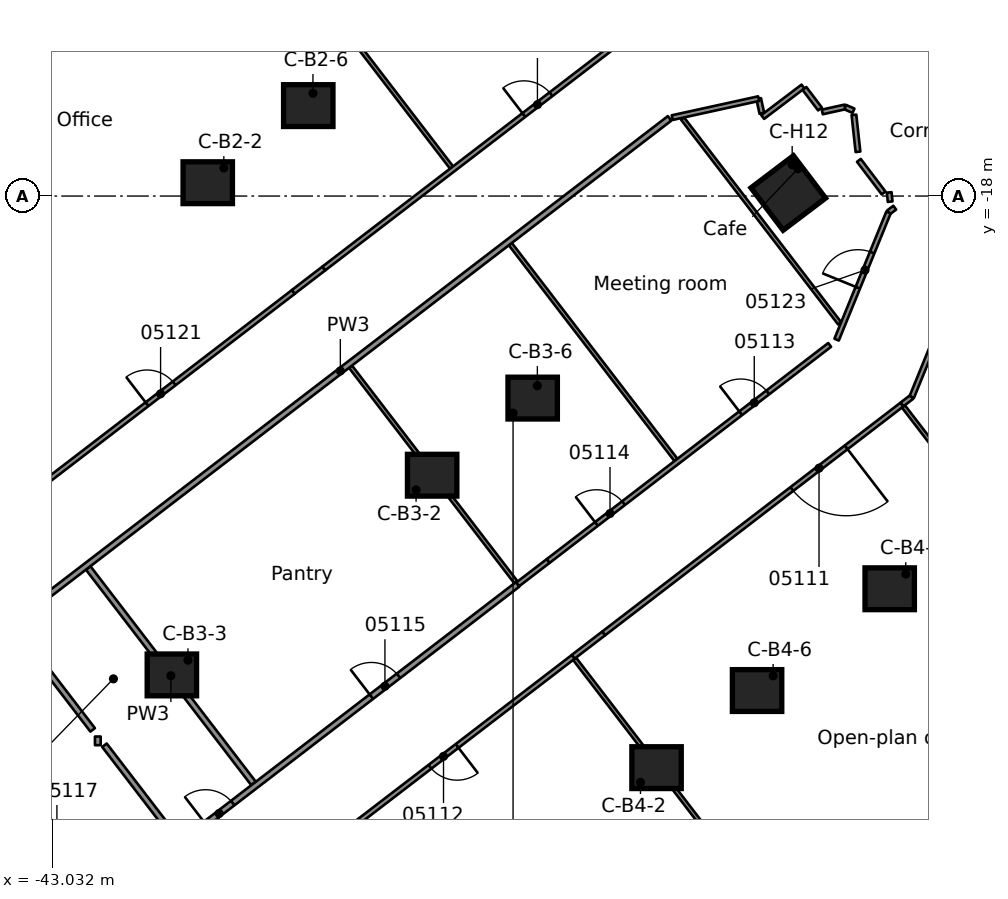
"""IFC4 building model, lengths in metres.
Left out: names, types, materials, properties, quantities, classifications, styles, units other than length and angle.
Written with IfcOpenShell. Run it as: python <this file> out.ifc"""

import sys

from ifc_helpers import new_model, si_unit, direction, frame, frame_2d, origin, origin_2d, place, context, subcontext, project, spatial, rectangle, extrude, element, fill, save


model = new_model("IFC4")
c1 = context("Model", 3, precision=1e-05, world=origin(), true_north=direction((0.0, 1.0)))
c2 = subcontext(c1, "Body", "Model", "MODEL_VIEW")
j1 = project(units=[si_unit("LENGTHUNIT", "METRE"), si_unit("PLANEANGLEUNIT", "RADIAN")], contexts=[c1])
p1 = place(None, origin())
s1 = spatial("IfcSite", under=j1, at=p1, CompositionType="ELEMENT")
p2 = place(p1, origin())
s2 = spatial("IfcBuilding", under=s1, at=p2, CompositionType="ELEMENT")
p3 = place(p2, frame((0.0, 0.0, 25.1)))
s3 = spatial("IfcBuildingStorey", under=s2, at=p3, CompositionType="ELEMENT", Elevation=25.1)
for number, where, z_axis, x_axis in (
    (1, (-38.935, -17.649, 0.0), (0.0, 0.0, 1.0), (1.0, 0.0, 0.0)),
    (2, (-36.29, -15.62, 0.0), (0.0, 0.0, 1.0), (1.0, 0.0, 0.0)),
    (3, (-33.03, -25.345, 0.0), (0.0, 0.0, 1.0), (1.0, 0.0, 0.0)),
    (4, (-39.879, -30.6, 0.0), (0.0, 0.0, 1.0), (1.0, 0.0, 0.0)),
    (5, (-30.385, -23.316, 0.0), (0.0, 0.0, 1.0), (1.0, 0.0, 0.0)),
    (6, (-27.125, -33.04, 0.0), (0.0, 0.0, 1.0), (1.0, 0.0, 0.0)),
    (7, (-24.48, -31.011, 0.0), (0.0, 0.0, 1.0), (1.0, 0.0, 0.0)),
    (8, (-20.99, -28.333, 0.0), (0.0, 0.0, 1.0), (1.0, 0.0, 0.0)),
):
    element("IfcColumn", number, at=place(p3, frame(where, z_axis=z_axis, x_axis=x_axis)), inside=s3, PredefinedType="COLUMN", context=c2, shape_type="SweptSolid", body=[
        extrude(rectangle(XDim=1.3, YDim=1.1, at=origin_2d()), origin(), (0.0, 0.0, 1.0), 4.1),
    ])
p4 = place(p3, frame((-23.659, -17.919, 0.0), z_axis=(0.0, 0.0, 1.0), x_axis=(-0.797162615875, -0.603764659327, 0.0)))
e9 = element("IfcColumn", 9, at=p4, inside=s3, PredefinedType="COLUMN", context=c2, shape_type="SweptSolid", body=[
    extrude(rectangle(XDim=1.4, YDim=1.4, at=origin_2d()), origin(), (0.0, 0.0, 1.0), 4.1),
])
p5 = place(p3, frame((-21.004, -17.904, 0.0), z_axis=(0.0, 0.0, 1.0), x_axis=(0.105933230141, -0.994373245191, 0.0)))
e10 = element("IfcWall", 10, at=p5, inside=s3, PredefinedType="PARTITIONING", context=c2, shape_type="SweptSolid", body=[
    extrude(rectangle(XDim=0.244, YDim=0.125, at=frame_2d((0.122, 0.0))), origin(), (0.0, 0.0, 1.0), 3.68),
])
p6 = place(p3, frame((-21.931, -15.864, 0.0), z_axis=(0.0, 0.0, 1.0), x_axis=(0.10837572028, -0.99411000561, 0.0)))
e11 = element("IfcWall", 11, at=p6, inside=s3, PredefinedType="PARTITIONING", context=c2, shape_type="SweptSolid", body=[
    extrude(rectangle(XDim=0.978, YDim=0.125, at=frame_2d((0.489, 0.0))), origin(), (0.0, 0.0, 1.0), 3.68),
])
p7 = place(p3, frame((-24.438, -15.437, 0.0), z_axis=(0.0, 0.0, 1.0), x_axis=(0.212096867325, -0.977248647413, 0.0)))
e12 = element("IfcWall", 12, at=p7, inside=s3, PredefinedType="PARTITIONING", context=c2, shape_type="SweptSolid", body=[
    extrude(rectangle(XDim=0.396, YDim=0.125, at=frame_2d((0.198, 0.0))), origin(), (0.0, 0.0, 1.0), 3.68),
])
p8 = place(p3, frame((-23.234, -15.168, 0.0), z_axis=(0.0, 0.0, 1.0), x_axis=(0.602990949897, -0.797748026849, 0.0)))
e13 = element("IfcWall", 13, at=p8, inside=s3, PredefinedType="PARTITIONING", context=c2, shape_type="SweptSolid", body=[
    extrude(rectangle(XDim=0.678, YDim=0.125, at=frame_2d((0.339, 0.0))), origin(), (0.0, 0.0, 1.0), 3.68),
])
p9 = place(p3, frame((-21.801, -17.061, 0.0), z_axis=(0.0, 0.0, 1.0), x_axis=(0.604123687543, -0.796890563471, 0.0)))
e14 = element("IfcWall", 14, at=p9, inside=s3, PredefinedType="PARTITIONING", context=c2, shape_type="SweptSolid", body=[
    extrude(rectangle(XDim=1.078, YDim=0.125, at=frame_2d((0.539, 0.0))), origin(), (0.0, 0.0, 1.0), 3.68),
])
p10 = place(p3, frame((-40.384, -38.535, 0.0), z_axis=(0.0, 0.0, 1.0), x_axis=(-0.609026744184, 0.793149686294, 0.0)))
e15 = element("IfcWall", 15, at=p10, inside=s3, PredefinedType="PARTITIONING", context=c2, shape_type="SweptSolid", body=[
    extrude(rectangle(XDim=11.975, YDim=0.125, at=frame_2d((5.987, 0.0))), origin(), (0.0, 0.0, 1.0), 3.68),
])
p11 = place(p10, frame((3.688, 0.0, 0.0)))
e16 = element("IfcOpeningElement", 16, at=p11, cuts=e15, PredefinedType="OPENING", context=c2, shape_type="SweptSolid", body=[
    extrude(rectangle(XDim=0.9, YDim=2.1, at=frame_2d((0.45, 1.05))), frame((0.0, 0.073, 0.0), z_axis=(0.0, -1.0, 0.0), x_axis=(1.0, 0.0, 0.0)), (0.0, 0.0, 1.0), 0.145),
])
p12 = place(p10, frame((7.338, 0.0, 0.0)))
e17 = element("IfcOpeningElement", 17, at=p12, cuts=e15, PredefinedType="OPENING", context=c2, shape_type="SweptSolid", body=[
    extrude(rectangle(XDim=0.9, YDim=2.1, at=frame_2d((0.45, 1.05))), frame((0.0, 0.073, 0.0), z_axis=(0.0, -1.0, 0.0), x_axis=(1.0, 0.0, 0.0)), (0.0, 0.0, 1.0), 0.145),
])
p13 = place(p3, frame((-44.064, -29.307, 0.0), z_axis=(0.0, 0.0, 1.0), x_axis=(0.608421148176, -0.793614331053, 0.0)))
e18 = element("IfcWall", 18, at=p13, inside=s3, PredefinedType="PARTITIONING", context=c2, shape_type="SweptSolid", body=[
    extrude(rectangle(XDim=3.451, YDim=0.15, at=frame_2d((1.726, 0.0))), origin(), (0.0, 0.0, 1.0), 3.68),
])
p14 = place(p3, frame((-41.653, -32.45, 0.0), z_axis=(0.0, 0.0, 1.0), x_axis=(0.60867753108, -0.793417710389, 0.0)))
e19 = element("IfcWall", 19, at=p14, inside=s3, PredefinedType="PARTITIONING", context=c2, shape_type="SweptSolid", body=[
    extrude(rectangle(XDim=3.188, YDim=0.15, at=frame_2d((1.594, 0.0))), origin(), (0.0, 0.0, 1.0), 3.68),
])
p15 = place(p3, frame((-42.081, -27.786, 0.0), z_axis=(0.0, 0.0, 1.0), x_axis=(0.608779288924, -0.793339635577, 0.0)))
e20 = element("IfcWall", 20, at=p15, inside=s3, PredefinedType="PARTITIONING", context=c2, shape_type="SweptSolid", body=[
    extrude(rectangle(XDim=7.147, YDim=0.15, at=frame_2d((3.574, 0.0))), origin(), (0.0, 0.0, 1.0), 3.68),
])
p16 = place(p3, frame((-35.179, -22.489, 0.0), z_axis=(0.0, 0.0, 1.0), x_axis=(0.608729798771, -0.793377610024, 0.0)))
e21 = element("IfcWall", 21, at=p16, inside=s3, PredefinedType="PARTITIONING", context=c2, shape_type="SweptSolid", body=[
    extrude(rectangle(XDim=7.148, YDim=0.1, at=frame_2d((3.574, 0.0))), origin(), (0.0, 0.0, 1.0), 3.68),
])
p17 = place(p3, frame((-29.282, -30.176, 0.0), z_axis=(0.0, 0.0, 1.0), x_axis=(0.608773787241, -0.793343857333, 0.0)))
e22 = element("IfcWall", 22, at=p17, inside=s3, PredefinedType="PARTITIONING", context=c2, shape_type="SweptSolid", body=[
    extrude(rectangle(XDim=14.135, YDim=0.1, at=frame_2d((7.067, 0.0))), origin(), (0.0, 0.0, 1.0), 3.68),
])
p18 = place(p3, frame((-41.126, -6.033, 0.0), z_axis=(0.0, 0.0, 1.0), x_axis=(0.608775561638, -0.793342495743, 0.0)))
e23 = element("IfcWall", 23, at=p18, inside=s3, PredefinedType="PARTITIONING", context=c2, shape_type="SweptSolid", body=[
    extrude(rectangle(XDim=14.136, YDim=0.1, at=frame_2d((7.068, 0.0))), origin(), (0.0, 0.0, 1.0), 3.68),
])
p19 = place(p3, frame((-30.975, -19.261, 0.0), z_axis=(0.0, 0.0, 1.0), x_axis=(0.60876639971, -0.793349526113, 0.0)))
e24 = element("IfcWall", 24, at=p19, inside=s3, PredefinedType="PARTITIONING", context=c2, shape_type="SweptSolid", body=[
    extrude(rectangle(XDim=7.162, YDim=0.1, at=frame_2d((3.581, 0.0))), origin(), (0.0, 0.0, 1.0), 3.68),
])
p20 = place(p3, frame((-26.44, -15.962, 0.0), z_axis=(0.0, 0.0, 1.0), x_axis=(0.608697215762, -0.79340260872, 0.0)))
e25 = element("IfcWall", 25, at=p20, inside=s3, PredefinedType="PARTITIONING", context=c2, shape_type="SweptSolid", body=[
    extrude(rectangle(XDim=6.79, YDim=0.1, at=frame_2d((3.395, 0.0))), origin(), (0.0, 0.0, 1.0), 3.68),
])
p21 = place(p3, frame((-20.629, -23.535, 0.0), z_axis=(0.0, 0.0, 1.0), x_axis=(0.608775561638, -0.793342495743, 0.0)))
e26 = element("IfcWall", 26, at=p21, inside=s3, PredefinedType="PARTITIONING", context=c2, shape_type="SweptSolid", body=[
    extrude(rectangle(XDim=14.136, YDim=0.1, at=frame_2d((7.068, 0.0))), origin(), (0.0, 0.0, 1.0), 3.68),
])
p22 = place(p3, frame((-22.17, -15.656, 0.0), z_axis=(0.0, 0.0, 1.0), x_axis=(0.914864311429, -0.403761429156, 0.0)))
e27 = element("IfcWall", 27, at=p22, inside=s3, PredefinedType="PARTITIONING", context=c2, shape_type="SweptSolid", body=[
    extrude(rectangle(XDim=0.248, YDim=0.125, at=frame_2d((0.124, 0.0))), origin(), (0.0, 0.0, 1.0), 3.68),
])
p23 = place(p3, frame((-26.712, -15.936, 0.0), z_axis=(0.0, 0.0, 1.0), x_axis=(0.976756126143, 0.214353609817, 0.0)))
e28 = element("IfcWall", 28, at=p23, inside=s3, PredefinedType="PARTITIONING", context=c2, shape_type="SweptSolid", body=[
    extrude(rectangle(XDim=2.328, YDim=0.125, at=frame_2d((1.164, 0.0))), origin(), (0.0, 0.0, 1.0), 3.68),
])
p24 = place(p3, frame((-22.765, -15.787, 0.0), z_axis=(0.0, 0.0, 1.0), x_axis=(0.97657209397, 0.215190486033, 0.0)))
e29 = element("IfcWall", 29, at=p24, inside=s3, PredefinedType="PARTITIONING", context=c2, shape_type="SweptSolid", body=[
    extrude(rectangle(XDim=0.609, YDim=0.125, at=frame_2d((0.305, 0.0))), origin(), (0.0, 0.0, 1.0), 3.68),
])
p25 = place(p3, frame((-24.332, -15.92, 0.0), z_axis=(0.0, 0.0, 1.0), x_axis=(0.797480426333, 0.603344818172, 0.0)))
e30 = element("IfcWall", 30, at=p25, inside=s3, PredefinedType="PARTITIONING", context=c2, shape_type="SweptSolid", body=[
    extrude(rectangle(XDim=1.329, YDim=0.125, at=frame_2d((0.665, 0.0))), origin(), (0.0, 0.0, 1.0), 3.68),
])
p26 = place(p3, frame((-21.019, -18.428, 0.0), z_axis=(0.0, 0.0, 1.0), x_axis=(0.797092148154, 0.603857687995, 0.0)))
e31 = element("IfcWall", 31, at=p26, inside=s3, PredefinedType="PARTITIONING", context=c2, shape_type="SweptSolid", body=[
    extrude(rectangle(XDim=0.202, YDim=0.125, at=frame_2d((0.101, 0.0))), origin(), (0.0, 0.0, 1.0), 3.68),
])
p27 = place(p3, frame((-29.32, -30.124, 0.0), z_axis=(0.0, 0.0, 1.0), x_axis=(0.793776779764, 0.608209194198, 0.0)))
e32 = element("IfcWall", 32, at=p27, inside=s3, PredefinedType="PARTITIONING", context=c2, shape_type="SweptSolid", body=[
    extrude(rectangle(XDim=1.014, YDim=0.125, at=frame_2d((0.507, 0.0))), origin(), (0.0, 0.0, 1.0), 3.68),
])
p28 = place(p3, frame((-20.668, -23.484, 0.0), z_axis=(0.0, 0.0, 1.0), x_axis=(0.794079485755, 0.607813927368, 0.0)))
e33 = element("IfcWall", 33, at=p28, inside=s3, PredefinedType="PARTITIONING", context=c2, shape_type="SweptSolid", body=[
    extrude(rectangle(XDim=0.324, YDim=0.125, at=frame_2d((0.162, 0.0))), origin(), (0.0, 0.0, 1.0), 3.68),
])
p29 = place(p3, frame((-29.32, -30.127, 0.0), z_axis=(0.0, 0.0, 1.0), x_axis=(-0.793456491448, -0.608626976217, 0.0)))
e34 = element("IfcWall", 34, at=p29, inside=s3, PredefinedType="PARTITIONING", context=c2, shape_type="SweptSolid", body=[
    extrude(rectangle(XDim=13.898, YDim=0.125, at=frame_2d((6.949, 0.0))), origin(), (0.0, 0.0, 1.0), 3.68),
])
p30 = place(p29, frame((3.849, 0.0, 0.0)))
e35 = element("IfcOpeningElement", 35, at=p30, cuts=e34, PredefinedType="OPENING", context=c2, shape_type="SweptSolid", body=[
    extrude(rectangle(XDim=0.9, YDim=2.1, at=frame_2d((0.45, 1.05))), frame((0.0, 0.073, 0.0), z_axis=(0.0, -1.0, 0.0), x_axis=(1.0, 0.0, 0.0)), (0.0, 0.0, 1.0), 0.145),
])
p31 = place(p3, frame((-20.669, -23.487, 0.0), z_axis=(0.0, 0.0, 1.0), x_axis=(-0.793372266626, -0.608736762935, 0.0)))
e36 = element("IfcWall", 36, at=p31, inside=s3, PredefinedType="PARTITIONING", context=c2, shape_type="SweptSolid", body=[
    extrude(rectangle(XDim=9.889, YDim=0.125, at=frame_2d((4.945, 0.0))), origin(), (0.0, 0.0, 1.0), 3.68),
])
p32 = place(p31, frame((1.849, 0.0, 0.0)))
e37 = element("IfcOpeningElement", 37, at=p32, cuts=e36, PredefinedType="OPENING", context=c2, shape_type="SweptSolid", body=[
    extrude(rectangle(XDim=1.8, YDim=2.1, at=frame_2d((0.9, 1.05))), frame((0.0, 0.073, 0.0), z_axis=(0.0, -1.0, 0.0), x_axis=(1.0, 0.0, 0.0)), (0.0, 0.0, 1.0), 0.145),
])
p33 = place(p3, frame((-30.782, -28.22, 0.0), z_axis=(0.0, 0.0, 1.0), x_axis=(0.793579274907, 0.608466872096, 0.0)))
e38 = element("IfcWall", 38, at=p33, inside=s3, PredefinedType="PARTITIONING", context=c2, shape_type="SweptSolid", body=[
    extrude(rectangle(XDim=1.016, YDim=0.125, at=frame_2d((0.508, 0.0))), origin(), (0.0, 0.0, 1.0), 3.68),
])
p34 = place(p3, frame((-39.667, -35.038, 0.0), z_axis=(0.0, 0.0, 1.0), x_axis=(0.793293656215, 0.608839202917, 0.0)))
e39 = element("IfcWall", 39, at=p34, inside=s3, PredefinedType="PARTITIONING", context=c2, shape_type="SweptSolid", body=[
    extrude(rectangle(XDim=11.2, YDim=0.15, at=frame_2d((5.6, 0.0))), origin(), (0.0, 0.0, 1.0), 3.68),
])
p35 = place(p34, frame((6.35, 0.0, 0.0)))
e40 = element("IfcOpeningElement", 40, at=p35, cuts=e39, PredefinedType="OPENING", context=c2, shape_type="SweptSolid", body=[
    extrude(rectangle(XDim=0.9, YDim=2.1, at=frame_2d((0.45, 1.05))), frame((0.0, 0.085, 0.0), z_axis=(0.0, -1.0, 0.0), x_axis=(1.0, 0.0, 0.0)), (0.0, 0.0, 1.0), 0.17),
])
p36 = place(p34, frame((0.85, 0.0, 0.0)))
e41 = element("IfcOpeningElement", 41, at=p36, cuts=e39, PredefinedType="OPENING", context=c2, shape_type="SweptSolid", body=[
    extrude(rectangle(XDim=0.9, YDim=2.1, at=frame_2d((0.45, 1.05))), frame((0.0, 0.085, 0.0), z_axis=(0.0, -1.0, 0.0), x_axis=(1.0, 0.0, 0.0)), (0.0, 0.0, 1.0), 0.17),
])
p37 = place(p3, frame((-29.976, -27.602, 0.0), z_axis=(0.0, 0.0, 1.0), x_axis=(0.793237948633, 0.608911780843, 0.0)))
e42 = element("IfcWall", 42, at=p37, inside=s3, PredefinedType="PARTITIONING", context=c2, shape_type="SweptSolid", body=[
    extrude(rectangle(XDim=9.336, YDim=0.125, at=frame_2d((4.668, 0.0))), origin(), (0.0, 0.0, 1.0), 3.68),
])
p38 = place(p37, frame((6.385, 0.0, 0.0)))
e43 = element("IfcOpeningElement", 43, at=p38, cuts=e42, PredefinedType="OPENING", context=c2, shape_type="SweptSolid", body=[
    extrude(rectangle(XDim=0.9, YDim=2.1, at=frame_2d((0.45, 1.05))), frame((0.0, 0.073, 0.0), z_axis=(0.0, -1.0, 0.0), x_axis=(1.0, 0.0, 0.0)), (0.0, 0.0, 1.0), 0.145),
])
p39 = place(p37, frame((1.6, 0.0, 0.0)))
e44 = element("IfcOpeningElement", 44, at=p39, cuts=e42, PredefinedType="OPENING", context=c2, shape_type="SweptSolid", body=[
    extrude(rectangle(XDim=0.9, YDim=2.1, at=frame_2d((0.45, 1.05))), frame((0.0, 0.073, 0.0), z_axis=(0.0, -1.0, 0.0), x_axis=(1.0, 0.0, 0.0)), (0.0, 0.0, 1.0), 0.145),
])
p40 = place(p3, frame((-44.11, -29.247, 0.0), z_axis=(0.0, 0.0, 1.0), x_axis=(0.793471030698, 0.608608021179, 0.0)))
e45 = element("IfcWall", 45, at=p40, inside=s3, PredefinedType="PARTITIONING", context=c2, shape_type="SweptSolid", body=[
    extrude(rectangle(XDim=21.838, YDim=0.15, at=frame_2d((10.919, 0.0))), origin(), (0.0, 0.0, 1.0), 3.68),
])
p41 = place(p3, frame((-36.687, -20.524, 0.0), z_axis=(0.0, 0.0, 1.0), x_axis=(0.793579274907, 0.608466872096, 0.0)))
e46 = element("IfcWall", 46, at=p41, inside=s3, PredefinedType="PARTITIONING", context=c2, shape_type="SweptSolid", body=[
    extrude(rectangle(XDim=1.016, YDim=0.125, at=frame_2d((0.508, 0.0))), origin(), (0.0, 0.0, 1.0), 3.68),
])
p42 = place(p3, frame((-47.476, -28.803, 0.0), z_axis=(0.0, 0.0, 1.0), x_axis=(0.793430085013, 0.608661400284, 0.0)))
e47 = element("IfcWall", 47, at=p42, inside=s3, PredefinedType="PARTITIONING", context=c2, shape_type="SweptSolid", body=[
    extrude(rectangle(XDim=13.6, YDim=0.125, at=frame_2d((6.8, 0.0))), origin(), (0.0, 0.0, 1.0), 3.68),
])
p43 = place(p42, frame((2.326, 0.0, 0.0)))
e48 = element("IfcOpeningElement", 48, at=p43, cuts=e47, PredefinedType="OPENING", context=c2, shape_type="SweptSolid", body=[
    extrude(rectangle(XDim=0.9, YDim=2.1, at=frame_2d((0.45, 1.05))), frame((0.0, 0.073, 0.0), z_axis=(0.0, -1.0, 0.0), x_axis=(1.0, 0.0, 0.0)), (0.0, 0.0, 1.0), 0.145),
])
p44 = place(p42, frame((8.75, 0.0, 0.0)))
e49 = element("IfcOpeningElement", 49, at=p44, cuts=e47, PredefinedType="OPENING", context=c2, shape_type="SweptSolid", body=[
    extrude(rectangle(XDim=0.9, YDim=2.1, at=frame_2d((0.45, 1.05))), frame((0.0, 0.073, 0.0), z_axis=(0.0, -1.0, 0.0), x_axis=(1.0, 0.0, 0.0)), (0.0, 0.0, 1.0), 0.145),
])
p45 = place(p3, frame((-35.881, -19.906, 0.0), z_axis=(0.0, 0.0, 1.0), x_axis=(0.793491146474, 0.608581794394, 0.0)))
e50 = element("IfcWall", 50, at=p45, inside=s3, PredefinedType="PARTITIONING", context=c2, shape_type="SweptSolid", body=[
    extrude(rectangle(XDim=9.892, YDim=0.125, at=frame_2d((4.946, 0.0))), origin(), (0.0, 0.0, 1.0), 3.68),
])
p46 = place(p45, frame((6.634, 0.0, 0.0)))
e51 = element("IfcOpeningElement", 51, at=p46, cuts=e50, PredefinedType="OPENING", context=c2, shape_type="SweptSolid", body=[
    extrude(rectangle(XDim=0.9, YDim=2.1, at=frame_2d((0.45, 1.05))), frame((0.0, 0.073, 0.0), z_axis=(0.0, -1.0, 0.0), x_axis=(1.0, 0.0, 0.0)), (0.0, 0.0, 1.0), 0.145),
])
p47 = place(p3, frame((-18.51, -18.634, 0.0), z_axis=(0.0, 0.0, 1.0), x_axis=(-0.377932698015, -0.925833071224, 0.0)))
e52 = element("IfcWall", 52, at=p47, inside=s3, PredefinedType="PARTITIONING", context=c2, shape_type="SweptSolid", body=[
    extrude(rectangle(XDim=5.024, YDim=0.125, at=frame_2d((2.512, 0.0))), origin(), (0.0, 0.0, 1.0), 3.68),
])
p48 = place(p47, frame((1.6, 0.0, 0.0)))
e53 = element("IfcOpeningElement", 53, at=p48, cuts=e52, PredefinedType="OPENING", context=c2, shape_type="SweptSolid", body=[
    extrude(rectangle(XDim=1.8, YDim=2.1, at=frame_2d((0.9, 1.05))), frame((0.0, 0.073, 0.0), z_axis=(0.0, -1.0, 0.0), x_axis=(1.0, 0.0, 0.0)), (0.0, 0.0, 1.0), 0.145),
])
p49 = place(p3, frame((-22.387, -21.778, 0.0), z_axis=(0.0, 0.0, 1.0), x_axis=(0.377843834017, 0.925869341265, 0.0)))
e54 = element("IfcWall", 54, at=p49, inside=s3, PredefinedType="PARTITIONING", context=c2, shape_type="SweptSolid", body=[
    extrude(rectangle(XDim=3.615, YDim=0.125, at=frame_2d((1.808, 0.0))), origin(), (0.0, 0.0, 1.0), 3.68),
])
p50 = place(p49, frame((1.476, 0.0, 0.0)))
e55 = element("IfcOpeningElement", 55, at=p50, cuts=e54, PredefinedType="OPENING", context=c2, shape_type="SweptSolid", body=[
    extrude(rectangle(XDim=1.0, YDim=2.1, at=frame_2d((0.5, 1.05))), frame((0.0, 0.073, 0.0), z_axis=(0.0, -1.0, 0.0), x_axis=(1.0, 0.0, 0.0)), (0.0, 0.0, 1.0), 0.145),
])
p51 = place(p3, frame((-41.828, -32.449, 0.0), z_axis=(0.0, 0.0, 1.0), x_axis=(0.0, 1.0, 0.0)))
e56 = element("IfcWall", 56, at=p51, inside=s3, PredefinedType="PARTITIONING", context=c2, shape_type="SweptSolid", body=[
    extrude(rectangle(XDim=0.228, YDim=0.15, at=frame_2d((0.114, 0.0))), origin(), (0.0, 0.0, 1.0), 3.68),
])
p52 = place(p32, origin())
e57 = element("IfcDoor", 57, at=p52, inside=s3, OperationType="DOUBLE_DOOR_SINGLE_SWING", PredefinedType="DOOR", context=c2, shape_type="SweptSolid", body=[
    extrude(rectangle(XDim=1.8, YDim=2.1, at=frame_2d((0.9, 1.05))), frame((0.0, 0.025, 0.0), z_axis=(0.0, -1.0, 0.0), x_axis=(1.0, 0.0, 0.0)), (0.0, 0.0, 1.0), 0.05),
])
fill(e37, e57)
p53 = place(p30, origin())
e58 = element("IfcDoor", 58, at=p53, inside=s3, OperationType="SINGLE_SWING_LEFT", PredefinedType="DOOR", context=c2, shape_type="SweptSolid", body=[
    extrude(rectangle(XDim=0.9, YDim=2.1, at=frame_2d((0.45, 1.05))), frame((0.0, 0.025, 0.0), z_axis=(0.0, -1.0, 0.0), x_axis=(1.0, 0.0, 0.0)), (0.0, 0.0, 1.0), 0.05),
])
fill(e35, e58)
p54 = place(p38, origin())
e59 = element("IfcDoor", 59, at=p54, inside=s3, OperationType="SINGLE_SWING_RIGHT", PredefinedType="DOOR", context=c2, shape_type="SweptSolid", body=[
    extrude(rectangle(XDim=0.9, YDim=2.1, at=frame_2d((0.45, 1.05))), frame((0.0, 0.025, 0.0), z_axis=(0.0, -1.0, 0.0), x_axis=(1.0, 0.0, 0.0)), (0.0, 0.0, 1.0), 0.05),
])
fill(e43, e59)
p55 = place(p39, origin())
e60 = element("IfcDoor", 60, at=p55, inside=s3, OperationType="SINGLE_SWING_LEFT", PredefinedType="DOOR", context=c2, shape_type="SweptSolid", body=[
    extrude(rectangle(XDim=0.9, YDim=2.1, at=frame_2d((0.45, 1.05))), frame((0.0, 0.025, 0.0), z_axis=(0.0, -1.0, 0.0), x_axis=(1.0, 0.0, 0.0)), (0.0, 0.0, 1.0), 0.05),
])
fill(e44, e60)
p56 = place(p35, origin())
e61 = element("IfcDoor", 61, at=p56, inside=s3, OperationType="SINGLE_SWING_RIGHT", PredefinedType="DOOR", context=c2, shape_type="SweptSolid", body=[
    extrude(rectangle(XDim=0.9, YDim=2.1, at=frame_2d((0.45, 1.05))), frame((0.0, 0.025, 0.0), z_axis=(0.0, -1.0, 0.0), x_axis=(1.0, 0.0, 0.0)), (0.0, 0.0, 1.0), 0.05),
])
fill(e40, e61)
p57 = place(p36, origin())
e62 = element("IfcDoor", 62, at=p57, inside=s3, OperationType="SINGLE_SWING_LEFT", PredefinedType="DOOR", context=c2, shape_type="SweptSolid", body=[
    extrude(rectangle(XDim=0.9, YDim=2.1, at=frame_2d((0.45, 1.05))), frame((0.0, 0.025, 0.0), z_axis=(0.0, -1.0, 0.0), x_axis=(1.0, 0.0, 0.0)), (0.0, 0.0, 1.0), 0.05),
])
fill(e41, e62)
p58 = place(p46, origin())
e63 = element("IfcDoor", 63, at=p58, inside=s3, OperationType="SINGLE_SWING_RIGHT", PredefinedType="DOOR", context=c2, shape_type="SweptSolid", body=[
    extrude(rectangle(XDim=0.9, YDim=2.1, at=frame_2d((0.45, 1.05))), frame((0.0, 0.025, 0.0), z_axis=(0.0, -1.0, 0.0), x_axis=(1.0, 0.0, 0.0)), (0.0, 0.0, 1.0), 0.05),
])
fill(e51, e63)
p59 = place(p44, origin())
e64 = element("IfcDoor", 64, at=p59, inside=s3, OperationType="SINGLE_SWING_RIGHT", PredefinedType="DOOR", context=c2, shape_type="SweptSolid", body=[
    extrude(rectangle(XDim=0.9, YDim=2.1, at=frame_2d((0.45, 1.05))), frame((0.0, 0.025, 0.0), z_axis=(0.0, -1.0, 0.0), x_axis=(1.0, 0.0, 0.0)), (0.0, 0.0, 1.0), 0.05),
])
fill(e49, e64)
p60 = place(p50, origin())
e65 = element("IfcDoor", 65, at=p60, inside=s3, OperationType="SINGLE_SWING_RIGHT", PredefinedType="DOOR", context=c2, shape_type="SweptSolid", body=[
    extrude(rectangle(XDim=1.0, YDim=2.1, at=frame_2d((0.5, 1.05))), frame((0.0, 0.025, 0.0), z_axis=(0.0, -1.0, 0.0), x_axis=(1.0, 0.0, 0.0)), (0.0, 0.0, 1.0), 0.05),
])
fill(e55, e65)
save(model, sys.argv[1])
